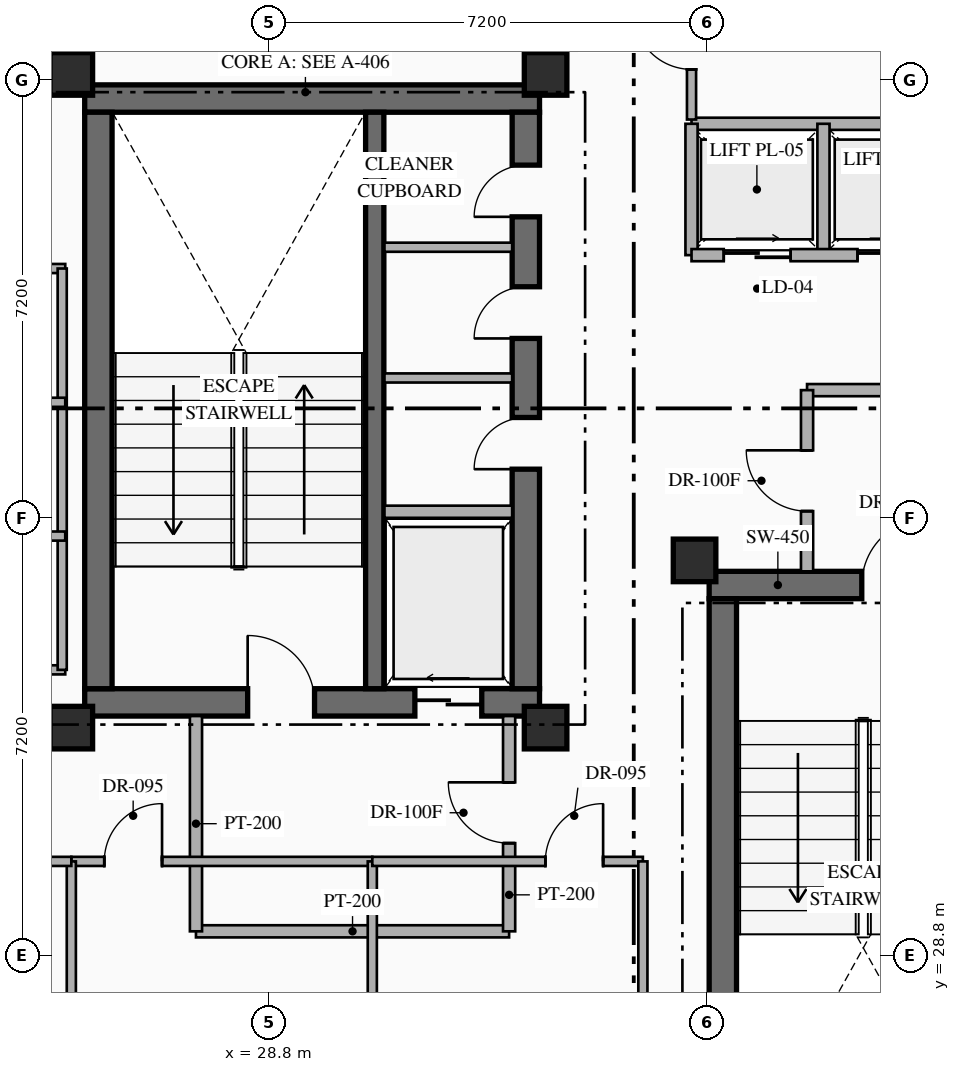
"""IFC4 building model, lengths in metres.
Left out: names, types, materials, properties, quantities, classifications, styles, units other than length and angle.
Written with IfcOpenShell. Run it as: python <this file> out.ifc"""

import sys

from ifc_helpers import new_model, si_unit, direction, frame, frame_2d, origin, origin_2d, place, context, subcontext, project, spatial, rectangle, hollow_rectangle, extrude, element, fill, save


model = new_model("IFC4")
c1 = context("Model", 3, precision=1e-05, world=origin(), true_north=direction((0.0, 1.0)))
c2 = subcontext(c1, "Body", "Model", "MODEL_VIEW")
j1 = project(units=[si_unit("LENGTHUNIT", "METRE"), si_unit("PLANEANGLEUNIT", "RADIAN")], contexts=[c1])
p1 = place(None, origin())
s1 = spatial("IfcSite", under=j1, at=p1, CompositionType="ELEMENT")
p2 = place(p1, origin())
s2 = spatial("IfcBuilding", under=s1, at=p2, CompositionType="ELEMENT")
p3 = place(p2, frame((0.0, 0.0, 227.55)))
s3 = spatial("IfcBuildingStorey", under=s2, at=p3, CompositionType="ELEMENT", Elevation=227.55)
p4 = place(p3, frame((25.77, 32.965, 0.0), z_axis=(0.0, 0.0, 1.0), x_axis=(1.0, 0.0, 0.0)))
e1 = element("IfcWall", 1, at=p4, inside=s3, PredefinedType="SHEAR", context=c2, shape_type="SweptSolid", body=[
    extrude(rectangle(XDim=7.48, YDim=0.45, at=frame_2d((3.74, 0.0))), origin(), (0.0, 0.0, 1.0), 3.6),
])
p5 = place(p4, frame((2.68, 0.0, 0.0)))
e2 = element("IfcOpeningElement", 2, at=p5, cuts=e1, PredefinedType="OPENING", context=c2, shape_type="SweptSolid", body=[
    extrude(rectangle(XDim=1.1, YDim=2.2, at=frame_2d((0.55, 1.1))), frame((0.0, 0.235, 0.0), z_axis=(0.0, -1.0, 0.0), x_axis=(1.0, 0.0, 0.0)), (0.0, 0.0, 1.0), 0.47),
])
p6 = place(p4, frame((5.43, 0.0, 0.0)))
e3 = element("IfcOpeningElement", 3, at=p6, cuts=e1, PredefinedType="OPENING", context=c2, shape_type="SweptSolid", body=[
    extrude(rectangle(XDim=1.1, YDim=2.15, at=frame_2d((0.55, 1.075))), frame((0.0, 0.235, 0.0), z_axis=(0.0, -1.0, 0.0), x_axis=(1.0, 0.0, 0.0)), (0.0, 0.0, 1.0), 0.47),
])
p7 = place(p3, frame((25.77, 42.895, 0.0), z_axis=(0.0, 0.0, 1.0), x_axis=(1.0, 0.0, 0.0)))
e4 = element("IfcWall", 4, at=p7, inside=s3, PredefinedType="SHEAR", context=c2, shape_type="SweptSolid", body=[
    extrude(rectangle(XDim=7.48, YDim=0.45, at=frame_2d((3.74, 0.0))), origin(), (0.0, 0.0, 1.0), 3.6),
])
p8 = place(p3, frame((25.995, 33.19, 0.0), z_axis=(0.0, 0.0, 1.0), x_axis=(0.0, 1.0, 0.0)))
e5 = element("IfcWall", 5, at=p8, inside=s3, PredefinedType="SHEAR", context=c2, shape_type="SweptSolid", body=[
    extrude(rectangle(XDim=9.48, YDim=0.45, at=frame_2d((4.74, 0.0))), origin(), (0.0, 0.0, 1.0), 3.6),
])
p9 = place(p3, frame((33.025, 33.19, 0.0), z_axis=(0.0, 0.0, 1.0), x_axis=(0.0, 1.0, 0.0)))
e6 = element("IfcWall", 6, at=p9, inside=s3, PredefinedType="SHEAR", context=c2, shape_type="SweptSolid", body=[
    extrude(rectangle(XDim=9.48, YDim=0.45, at=frame_2d((4.74, 0.0))), origin(), (0.0, 0.0, 1.0), 3.6),
])
p10 = place(p9, frame((3.61, 0.0, 0.0)))
e7 = element("IfcOpeningElement", 7, at=p10, cuts=e6, PredefinedType="OPENING", context=c2, shape_type="SweptSolid", body=[
    extrude(rectangle(XDim=0.85, YDim=2.08, at=frame_2d((0.425, 1.04))), frame((0.0, 0.235, 0.0), z_axis=(0.0, -1.0, 0.0), x_axis=(1.0, 0.0, 0.0)), (0.0, 0.0, 1.0), 0.47),
])
p11 = place(p9, frame((5.76, 0.0, 0.0)))
e8 = element("IfcOpeningElement", 8, at=p11, cuts=e6, PredefinedType="OPENING", context=c2, shape_type="SweptSolid", body=[
    extrude(rectangle(XDim=0.85, YDim=2.08, at=frame_2d((0.425, 1.04))), frame((0.0, 0.235, 0.0), z_axis=(0.0, -1.0, 0.0), x_axis=(1.0, 0.0, 0.0)), (0.0, 0.0, 1.0), 0.47),
])
p12 = place(p9, frame((7.76, 0.0, 0.0)))
e9 = element("IfcOpeningElement", 9, at=p12, cuts=e6, PredefinedType="OPENING", context=c2, shape_type="SweptSolid", body=[
    extrude(rectangle(XDim=0.85, YDim=2.08, at=frame_2d((0.425, 1.04))), frame((0.0, 0.235, 0.0), z_axis=(0.0, -1.0, 0.0), x_axis=(1.0, 0.0, 0.0)), (0.0, 0.0, 1.0), 0.47),
])
p13 = place(p3, frame((30.54, 33.19, 0.0), z_axis=(0.0, 0.0, 1.0), x_axis=(0.0, 1.0, 0.0)))
e10 = element("IfcWall", 10, at=p13, inside=s3, PredefinedType="SHEAR", context=c2, shape_type="SweptSolid", body=[
    extrude(rectangle(XDim=9.48, YDim=0.3, at=frame_2d((4.74, 0.0))), origin(), (0.0, 0.0, 1.0), 3.6),
])
p14 = place(p3, frame((36.04, 34.895, 0.0), z_axis=(0.0, 0.0, 1.0), x_axis=(1.0, 0.0, 0.0)))
e11 = element("IfcWall", 11, at=p14, inside=s3, PredefinedType="SHEAR", context=c2, shape_type="SweptSolid", body=[
    extrude(rectangle(XDim=7.46, YDim=0.45, at=frame_2d((3.73, 0.0))), origin(), (0.0, 0.0, 1.0), 3.6),
])
p15 = place(p14, frame((2.51, 0.0, 0.0)))
e12 = element("IfcOpeningElement", 12, at=p15, cuts=e11, PredefinedType="OPENING", context=c2, shape_type="SweptSolid", body=[
    extrude(rectangle(XDim=1.1, YDim=2.2, at=frame_2d((0.55, 1.1))), frame((0.0, 0.235, 0.0), z_axis=(0.0, -1.0, 0.0), x_axis=(1.0, 0.0, 0.0)), (0.0, 0.0, 1.0), 0.47),
])
p16 = place(p14, frame((5.41, 0.0, 0.0)))
e13 = element("IfcOpeningElement", 13, at=p16, cuts=e11, PredefinedType="OPENING", context=c2, shape_type="SweptSolid", body=[
    extrude(rectangle(XDim=1.12, YDim=2.15, at=frame_2d((0.56, 1.075))), frame((0.0, 0.235, 0.0), z_axis=(0.0, -1.0, 0.0), x_axis=(1.0, 0.0, 0.0)), (0.0, 0.0, 1.0), 0.47),
])
p17 = place(p3, frame((36.265, 25.19, 0.0), z_axis=(0.0, 0.0, 1.0), x_axis=(0.0, 1.0, 0.0)))
e14 = element("IfcWall", 14, at=p17, inside=s3, PredefinedType="SHEAR", context=c2, shape_type="SweptSolid", body=[
    extrude(rectangle(XDim=9.48, YDim=0.45, at=frame_2d((4.74, 0.0))), origin(), (0.0, 0.0, 1.0), 3.6),
])
for number, where, z_axis, x_axis in (
    (15, (25.55, 32.55, 0.0), (0.0, 0.0, 1.0), (1.0, 0.0, 0.0)),
    (16, (33.35, 32.55, 0.0), (0.0, 0.0, 1.0), (1.0, 0.0, 0.0)),
    (17, (25.55, 43.3, 0.0), (0.0, 0.0, 1.0), (1.0, 0.0, 0.0)),
    (18, (33.35, 43.3, 0.0), (0.0, 0.0, 1.0), (1.0, 0.0, 0.0)),
    (19, (35.8, 35.3, 0.0), (0.0, 0.0, 1.0), (1.0, 0.0, 0.0)),
):
    element("IfcColumn", number, at=place(p3, frame(where, z_axis=z_axis, x_axis=x_axis)), inside=s3, PredefinedType="COLUMN", context=c2, shape_type="SweptSolid", body=[
        extrude(hollow_rectangle(XDim=0.7, YDim=0.7, WallThickness=0.028, at=origin_2d()), origin(), (0.0, 0.0, 1.0), 3.6),
    ])
p18 = place(p3, frame((30.7, 36.1, 0.0), z_axis=(0.0, 0.0, 1.0), x_axis=(1.0, 0.0, 0.0)))
e20 = element("IfcWall", 20, at=p18, inside=s3, PredefinedType="STANDARD", context=c2, shape_type="SweptSolid", body=[
    extrude(rectangle(XDim=2.1, YDim=0.2, at=frame_2d((1.05, 0.0))), origin(), (0.0, 0.0, 1.0), 3.35),
])
for number, where, z_axis, x_axis in (
    (21, (30.7, 38.3, 0.0), (0.0, 0.0, 1.0), (1.0, 0.0, 0.0)),
    (22, (30.7, 40.45, 0.0), (0.0, 0.0, 1.0), (1.0, 0.0, 0.0)),
):
    element("IfcWall", number, at=place(p3, frame(where, z_axis=z_axis, x_axis=x_axis)), inside=s3, PredefinedType="PARTITIONING", context=c2, shape_type="SweptSolid", body=[
        extrude(rectangle(XDim=2.1, YDim=0.15, at=frame_2d((1.05, 0.0))), origin(), (0.0, 0.0, 1.0), 3.35),
    ])
p19 = place(p3, frame((27.6, 29.2, 0.0), z_axis=(0.0, 0.0, 1.0), x_axis=(1.0, 0.0, 0.0)))
e23 = element("IfcWall", 23, at=p19, inside=s3, PredefinedType="STANDARD", context=c2, shape_type="SweptSolid", body=[
    extrude(rectangle(XDim=5.15, YDim=0.2, at=frame_2d((2.575, 0.0))), origin(), (0.0, 0.0, 1.0), 3.35),
])
p20 = place(p3, frame((27.6, 29.2, 0.0), z_axis=(0.0, 0.0, 1.0), x_axis=(0.0, 1.0, 0.0)))
e24 = element("IfcWall", 24, at=p20, inside=s3, PredefinedType="STANDARD", context=c2, shape_type="SweptSolid", body=[
    extrude(rectangle(XDim=3.54, YDim=0.2, at=frame_2d((1.77, 0.0))), origin(), (0.0, 0.0, 1.0), 3.35),
])
p21 = place(p3, frame((32.75, 29.2, 0.0), z_axis=(0.0, 0.0, 1.0), x_axis=(0.0, 1.0, 0.0)))
e25 = element("IfcWall", 25, at=p21, inside=s3, PredefinedType="STANDARD", context=c2, shape_type="SweptSolid", body=[
    extrude(rectangle(XDim=3.54, YDim=0.2, at=frame_2d((1.77, 0.0))), origin(), (0.0, 0.0, 1.0), 3.35),
])
p22 = place(p21, frame((1.45, 0.0, 0.0)))
e26 = element("IfcOpeningElement", 26, at=p22, cuts=e25, PredefinedType="OPENING", context=c2, shape_type="SweptSolid", body=[
    extrude(rectangle(XDim=1.0, YDim=2.2, at=frame_2d((0.5, 1.1))), frame((0.0, 0.11, 0.0), z_axis=(0.0, -1.0, 0.0), x_axis=(1.0, 0.0, 0.0)), (0.0, 0.0, 1.0), 0.22),
])
p23 = place(p3, frame((37.65, 38.1, 0.0), z_axis=(0.0, 0.0, 1.0), x_axis=(1.0, 0.0, 0.0)))
e27 = element("IfcWall", 27, at=p23, inside=s3, PredefinedType="STANDARD", context=c2, shape_type="SweptSolid", body=[
    extrude(rectangle(XDim=5.3, YDim=0.2, at=frame_2d((2.65, 0.0))), origin(), (0.0, 0.0, 1.0), 3.35),
])
p24 = place(p3, frame((37.65, 35.12, 0.0), z_axis=(0.0, 0.0, 1.0), x_axis=(0.0, 1.0, 0.0)))
e28 = element("IfcWall", 28, at=p24, inside=s3, PredefinedType="STANDARD", context=c2, shape_type="SweptSolid", body=[
    extrude(rectangle(XDim=2.98, YDim=0.2, at=frame_2d((1.49, 0.0))), origin(), (0.0, 0.0, 1.0), 3.35),
])
p25 = place(p24, frame((0.99, 0.0, 0.0)))
e29 = element("IfcOpeningElement", 29, at=p25, cuts=e28, PredefinedType="OPENING", context=c2, shape_type="SweptSolid", body=[
    extrude(rectangle(XDim=1.0, YDim=2.2, at=frame_2d((0.5, 1.1))), frame((0.0, 0.11, 0.0), z_axis=(0.0, -1.0, 0.0), x_axis=(1.0, 0.0, 0.0)), (0.0, 0.0, 1.0), 0.22),
])
p26 = place(p3, frame((35.75, 42.48, 0.0), z_axis=(0.0, 0.0, 1.0), x_axis=(1.0, 0.0, 0.0)))
e30 = element("IfcWall", 30, at=p26, inside=s3, PredefinedType="STANDARD", context=c2, shape_type="SweptSolid", body=[
    extrude(rectangle(XDim=9.11, YDim=0.2, at=frame_2d((4.555, 0.0))), origin(), (0.0, 0.0, 1.0), 3.35),
])
for number, where, z_axis, x_axis in (
    (31, (35.75, 40.32, 0.0), (0.0, 0.0, 1.0), (0.0, 1.0, 0.0)),
    (32, (37.92, 40.32, 0.0), (0.0, 0.0, 1.0), (0.0, 1.0, 0.0)),
):
    element("IfcWall", number, at=place(p3, frame(where, z_axis=z_axis, x_axis=x_axis)), inside=s3, PredefinedType="STANDARD", context=c2, shape_type="SweptSolid", body=[
        extrude(rectangle(XDim=2.16, YDim=0.2, at=frame_2d((1.08, 0.0))), origin(), (0.0, 0.0, 1.0), 3.35),
    ])
p27 = place(p3, frame((35.75, 40.32, 0.0), z_axis=(0.0, 0.0, 1.0), x_axis=(1.0, 0.0, 0.0)))
e33 = element("IfcWall", 33, at=p27, inside=s3, PredefinedType="STANDARD", context=c2, shape_type="SweptSolid", body=[
    extrude(rectangle(XDim=9.11, YDim=0.2, at=frame_2d((4.555, 0.0))), origin(), (0.0, 0.0, 1.0), 3.35),
])
p28 = place(p27, frame((0.53, 0.0, 0.0)))
e34 = element("IfcOpeningElement", 34, at=p28, cuts=e33, PredefinedType="OPENING", context=c2, shape_type="SweptSolid", body=[
    extrude(rectangle(XDim=1.1, YDim=2.18, at=frame_2d((0.55, 1.09))), frame((0.0, 0.11, 0.0), z_axis=(0.0, -1.0, 0.0), x_axis=(1.0, 0.0, 0.0)), (0.0, 0.0, 1.0), 0.22),
])
p29 = place(p27, frame((2.73, 0.0, 0.0)))
e35 = element("IfcOpeningElement", 35, at=p29, cuts=e33, PredefinedType="OPENING", context=c2, shape_type="SweptSolid", body=[
    extrude(rectangle(XDim=1.1, YDim=2.18, at=frame_2d((0.55, 1.09))), frame((0.0, 0.11, 0.0), z_axis=(0.0, -1.0, 0.0), x_axis=(1.0, 0.0, 0.0)), (0.0, 0.0, 1.0), 0.22),
])
p30 = place(p27, frame((4.93, 0.0, 0.0)))
e36 = element("IfcOpeningElement", 36, at=p30, cuts=e33, PredefinedType="OPENING", context=c2, shape_type="SweptSolid", body=[
    extrude(rectangle(XDim=1.1, YDim=2.18, at=frame_2d((0.55, 1.09))), frame((0.0, 0.11, 0.0), z_axis=(0.0, -1.0, 0.0), x_axis=(1.0, 0.0, 0.0)), (0.0, 0.0, 1.0), 0.22),
])
p31 = place(p27, frame((7.13, 0.0, 0.0)))
e37 = element("IfcOpeningElement", 37, at=p31, cuts=e33, PredefinedType="OPENING", context=c2, shape_type="SweptSolid", body=[
    extrude(rectangle(XDim=1.1, YDim=2.18, at=frame_2d((0.55, 1.09))), frame((0.0, 0.11, 0.0), z_axis=(0.0, -1.0, 0.0), x_axis=(1.0, 0.0, 0.0)), (0.0, 0.0, 1.0), 0.22),
])
for number, where, z_axis, x_axis in (
    (38, (22.15, 33.5, 0.0), (0.0, 0.0, 1.0), (1.0, 0.0, 0.0)),
    (39, (22.15, 40.1, 0.0), (0.0, 0.0, 1.0), (1.0, 0.0, 0.0)),
):
    element("IfcWall", number, at=place(p3, frame(where, z_axis=z_axis, x_axis=x_axis)), inside=s3, PredefinedType="PARTITIONING", context=c2, shape_type="SweptSolid", body=[
        extrude(rectangle(XDim=3.3, YDim=0.15, at=frame_2d((1.65, 0.0))), origin(), (0.0, 0.0, 1.0), 3.35),
    ])
p32 = place(p3, frame((25.4, 33.5, 0.0), z_axis=(0.0, 0.0, 1.0), x_axis=(0.0, 1.0, 0.0)))
e40 = element("IfcWall", 40, at=p32, inside=s3, PredefinedType="PARTITIONING", context=c2, shape_type="SweptSolid", body=[
    extrude(rectangle(XDim=6.6, YDim=0.15, at=frame_2d((3.3, 0.0))), origin(), (0.0, 0.0, 1.0), 3.35),
])
for number, where, z_axis, x_axis in (
    (41, (22.15, 35.7, 0.0), (0.0, 0.0, 1.0), (1.0, 0.0, 0.0)),
    (42, (22.15, 37.9, 0.0), (0.0, 0.0, 1.0), (1.0, 0.0, 0.0)),
):
    element("IfcWall", number, at=place(p3, frame(where, z_axis=z_axis, x_axis=x_axis)), inside=s3, PredefinedType="PARTITIONING", context=c2, shape_type="SweptSolid", body=[
        extrude(rectangle(XDim=3.3, YDim=0.15, at=frame_2d((1.65, 0.0))), origin(), (0.0, 0.0, 1.0), 3.35),
    ])
p33 = place(p3, frame((25.55, 30.35, 0.0), z_axis=(0.0, 0.0, 1.0), x_axis=(1.0, 0.0, 0.0)))
e43 = element("IfcWall", 43, at=p33, inside=s3, PredefinedType="PARTITIONING", context=c2, shape_type="SweptSolid", body=[
    extrude(rectangle(XDim=4.95, YDim=0.15, at=frame_2d((2.475, 0.0))), origin(), (0.0, 0.0, 1.0), 3.35),
])
p34 = place(p33, frame((0.542, 0.0, 0.0)))
e44 = element("IfcOpeningElement", 44, at=p34, cuts=e43, PredefinedType="OPENING", context=c2, shape_type="SweptSolid", body=[
    extrude(rectangle(XDim=0.95, YDim=2.15, at=frame_2d((0.475, 1.075))), frame((0.0, 0.085, 0.0), z_axis=(0.0, -1.0, 0.0), x_axis=(1.0, 0.0, 0.0)), (0.0, 0.0, 1.0), 0.17),
])
p35 = place(p3, frame((25.55, 23.2, 0.0), z_axis=(0.0, 0.0, 1.0), x_axis=(0.0, 1.0, 0.0)))
e45 = element("IfcWall", 45, at=p35, inside=s3, PredefinedType="PARTITIONING", context=c2, shape_type="SweptSolid", body=[
    extrude(rectangle(XDim=7.15, YDim=0.15, at=frame_2d((3.575, 0.0))), origin(), (0.0, 0.0, 1.0), 2.757),
])
p36 = place(p3, frame((30.5, 23.2, 0.0), z_axis=(0.0, 0.0, 1.0), x_axis=(0.0, 1.0, 0.0)))
e46 = element("IfcWall", 46, at=p36, inside=s3, PredefinedType="PARTITIONING", context=c2, shape_type="SweptSolid", body=[
    extrude(rectangle(XDim=7.15, YDim=0.15, at=frame_2d((3.575, 0.0))), origin(), (0.0, 0.0, 1.0), 3.35),
])
p37 = place(p3, frame((30.5, 30.35, 0.0), z_axis=(0.0, 0.0, 1.0), x_axis=(1.0, 0.0, 0.0)))
e47 = element("IfcWall", 47, at=p37, inside=s3, PredefinedType="PARTITIONING", context=c2, shape_type="SweptSolid", body=[
    extrude(rectangle(XDim=4.45, YDim=0.15, at=frame_2d((2.225, 0.0))), origin(), (0.0, 0.0, 1.0), 3.35),
])
p38 = place(p37, frame((2.846, 0.0, 0.0)))
e48 = element("IfcOpeningElement", 48, at=p38, cuts=e47, PredefinedType="OPENING", context=c2, shape_type="SweptSolid", body=[
    extrude(rectangle(XDim=0.95, YDim=2.15, at=frame_2d((0.475, 1.075))), frame((0.0, 0.085, 0.0), z_axis=(0.0, -1.0, 0.0), x_axis=(1.0, 0.0, 0.0)), (0.0, 0.0, 1.0), 0.17),
])
p39 = place(p3, frame((34.95, 23.2, 0.0), z_axis=(0.0, 0.0, 1.0), x_axis=(0.0, 1.0, 0.0)))
e49 = element("IfcWall", 49, at=p39, inside=s3, PredefinedType="PARTITIONING", context=c2, shape_type="SweptSolid", body=[
    extrude(rectangle(XDim=7.15, YDim=0.15, at=frame_2d((3.575, 0.0))), origin(), (0.0, 0.0, 1.0), 3.35),
])
p40 = place(p3, frame((22.25, 30.35, 0.0), z_axis=(0.0, 0.0, 1.0), x_axis=(1.0, 0.0, 0.0)))
e50 = element("IfcWall", 50, at=p40, inside=s3, PredefinedType="PARTITIONING", context=c2, shape_type="SweptSolid", body=[
    extrude(rectangle(XDim=3.3, YDim=0.15, at=frame_2d((1.65, 0.0))), origin(), (0.0, 0.0, 1.0), 3.35),
])
p41 = place(p40, frame((1.175, 0.0, 0.0)))
e51 = element("IfcOpeningElement", 51, at=p41, cuts=e50, PredefinedType="OPENING", context=c2, shape_type="SweptSolid", body=[
    extrude(rectangle(XDim=0.95, YDim=2.15, at=frame_2d((0.475, 1.075))), frame((0.0, 0.085, 0.0), z_axis=(0.0, -1.0, 0.0), x_axis=(1.0, 0.0, 0.0)), (0.0, 0.0, 1.0), 0.17),
])
p42 = place(p3, frame((35.75, 42.55, 0.0), z_axis=(0.0, 0.0, 1.0), x_axis=(0.0, 1.0, 0.0)))
e52 = element("IfcWall", 52, at=p42, inside=s3, PredefinedType="PARTITIONING", context=c2, shape_type="SweptSolid", body=[
    extrude(rectangle(XDim=2.6, YDim=0.15, at=frame_2d((1.3, 0.0))), origin(), (0.0, 0.0, 1.0), 3.35),
])
p43 = place(p42, frame((0.825, 0.0, 0.0)))
e53 = element("IfcOpeningElement", 53, at=p43, cuts=e52, PredefinedType="OPENING", context=c2, shape_type="SweptSolid", body=[
    extrude(rectangle(XDim=0.95, YDim=2.15, at=frame_2d((0.475, 1.075))), frame((0.0, 0.085, 0.0), z_axis=(0.0, -1.0, 0.0), x_axis=(1.0, 0.0, 0.0)), (0.0, 0.0, 1.0), 0.17),
])
p44 = place(p5, origin())
e54 = element("IfcDoor", 54, at=p44, inside=s3, OperationType="SINGLE_SWING_LEFT", PredefinedType="DOOR", context=c2, shape_type="SweptSolid", body=[
    extrude(rectangle(XDim=1.1, YDim=2.2, at=frame_2d((0.55, 1.1))), frame((0.0, 0.025, 0.0), z_axis=(0.0, -1.0, 0.0), x_axis=(1.0, 0.0, 0.0)), (0.0, 0.0, 1.0), 0.05),
])
fill(e2, e54)
p45 = place(p6, origin())
e55 = element("IfcDoor", 55, at=p45, inside=s3, OperationType="SLIDING_TO_LEFT", PredefinedType="USERDEFINED", context=c2, shape_type="SweptSolid", body=[
    extrude(rectangle(XDim=1.1, YDim=2.15, at=frame_2d((0.55, 1.075))), frame((0.0, 0.025, 0.0), z_axis=(0.0, -1.0, 0.0), x_axis=(1.0, 0.0, 0.0)), (0.0, 0.0, 1.0), 0.05),
])
fill(e3, e55)
p46 = place(p15, origin())
e56 = element("IfcDoor", 56, at=p46, inside=s3, OperationType="SINGLE_SWING_RIGHT", PredefinedType="DOOR", context=c2, shape_type="SweptSolid", body=[
    extrude(rectangle(XDim=1.1, YDim=2.2, at=frame_2d((0.55, 1.1))), frame((0.0, 0.025, 0.0), z_axis=(0.0, -1.0, 0.0), x_axis=(1.0, 0.0, 0.0)), (0.0, 0.0, 1.0), 0.05),
])
fill(e12, e56)
p47 = place(p10, origin())
e57 = element("IfcDoor", 57, at=p47, inside=s3, OperationType="SINGLE_SWING_LEFT", PredefinedType="DOOR", context=c2, shape_type="SweptSolid", body=[
    extrude(rectangle(XDim=0.85, YDim=2.08, at=frame_2d((0.425, 1.04))), frame((0.0, 0.025, 0.0), z_axis=(0.0, -1.0, 0.0), x_axis=(1.0, 0.0, 0.0)), (0.0, 0.0, 1.0), 0.05),
])
fill(e7, e57)
p48 = place(p11, origin())
e58 = element("IfcDoor", 58, at=p48, inside=s3, OperationType="SINGLE_SWING_LEFT", PredefinedType="DOOR", context=c2, shape_type="SweptSolid", body=[
    extrude(rectangle(XDim=0.85, YDim=2.08, at=frame_2d((0.425, 1.04))), frame((0.0, 0.025, 0.0), z_axis=(0.0, -1.0, 0.0), x_axis=(1.0, 0.0, 0.0)), (0.0, 0.0, 1.0), 0.05),
])
fill(e8, e58)
p49 = place(p12, origin())
e59 = element("IfcDoor", 59, at=p49, inside=s3, OperationType="SINGLE_SWING_LEFT", PredefinedType="DOOR", context=c2, shape_type="SweptSolid", body=[
    extrude(rectangle(XDim=0.85, YDim=2.08, at=frame_2d((0.425, 1.04))), frame((0.0, 0.025, 0.0), z_axis=(0.0, -1.0, 0.0), x_axis=(1.0, 0.0, 0.0)), (0.0, 0.0, 1.0), 0.05),
])
fill(e9, e59)
p50 = place(p22, origin())
e60 = element("IfcDoor", 60, at=p50, inside=s3, OperationType="SINGLE_SWING_RIGHT", PredefinedType="DOOR", context=c2, shape_type="SweptSolid", body=[
    extrude(rectangle(XDim=1.0, YDim=2.2, at=frame_2d((0.5, 1.1))), frame((0.0, 0.025, 0.0), z_axis=(0.0, -1.0, 0.0), x_axis=(1.0, 0.0, 0.0)), (0.0, 0.0, 1.0), 0.05),
])
fill(e26, e60)
p51 = place(p25, origin())
e61 = element("IfcDoor", 61, at=p51, inside=s3, OperationType="SINGLE_SWING_RIGHT", PredefinedType="DOOR", context=c2, shape_type="SweptSolid", body=[
    extrude(rectangle(XDim=1.0, YDim=2.2, at=frame_2d((0.5, 1.1))), frame((0.0, 0.025, 0.0), z_axis=(0.0, -1.0, 0.0), x_axis=(1.0, 0.0, 0.0)), (0.0, 0.0, 1.0), 0.05),
])
fill(e29, e61)
p52 = place(p28, origin())
e62 = element("IfcDoor", 62, at=p52, inside=s3, OperationType="SLIDING_TO_RIGHT", PredefinedType="USERDEFINED", context=c2, shape_type="SweptSolid", body=[
    extrude(rectangle(XDim=1.1, YDim=2.18, at=frame_2d((0.55, 1.09))), frame((0.0, 0.025, 0.0), z_axis=(0.0, -1.0, 0.0), x_axis=(1.0, 0.0, 0.0)), (0.0, 0.0, 1.0), 0.05),
])
fill(e34, e62)
p53 = place(p29, origin())
e63 = element("IfcDoor", 63, at=p53, inside=s3, OperationType="SLIDING_TO_RIGHT", PredefinedType="USERDEFINED", context=c2, shape_type="SweptSolid", body=[
    extrude(rectangle(XDim=1.1, YDim=2.18, at=frame_2d((0.55, 1.09))), frame((0.0, 0.025, 0.0), z_axis=(0.0, -1.0, 0.0), x_axis=(1.0, 0.0, 0.0)), (0.0, 0.0, 1.0), 0.05),
])
fill(e35, e63)
p54 = place(p34, origin())
e64 = element("IfcDoor", 64, at=p54, inside=s3, OperationType="SINGLE_SWING_RIGHT", PredefinedType="DOOR", context=c2, shape_type="SweptSolid", body=[
    extrude(rectangle(XDim=0.95, YDim=2.15, at=frame_2d((0.475, 1.075))), frame((0.0, 0.025, 0.0), z_axis=(0.0, -1.0, 0.0), x_axis=(1.0, 0.0, 0.0)), (0.0, 0.0, 1.0), 0.05),
])
fill(e44, e64)
p55 = place(p38, origin())
e65 = element("IfcDoor", 65, at=p55, inside=s3, OperationType="SINGLE_SWING_RIGHT", PredefinedType="DOOR", context=c2, shape_type="SweptSolid", body=[
    extrude(rectangle(XDim=0.95, YDim=2.15, at=frame_2d((0.475, 1.075))), frame((0.0, 0.025, 0.0), z_axis=(0.0, -1.0, 0.0), x_axis=(1.0, 0.0, 0.0)), (0.0, 0.0, 1.0), 0.05),
])
fill(e48, e65)
p56 = place(p43, origin())
e66 = element("IfcDoor", 66, at=p56, inside=s3, OperationType="SINGLE_SWING_RIGHT", PredefinedType="DOOR", context=c2, shape_type="SweptSolid", body=[
    extrude(rectangle(XDim=0.95, YDim=2.15, at=frame_2d((0.475, 1.075))), frame((0.0, 0.025, 0.0), z_axis=(0.0, -1.0, 0.0), x_axis=(1.0, 0.0, 0.0)), (0.0, 0.0, 1.0), 0.05),
])
fill(e53, e66)
save(model, sys.argv[1])
